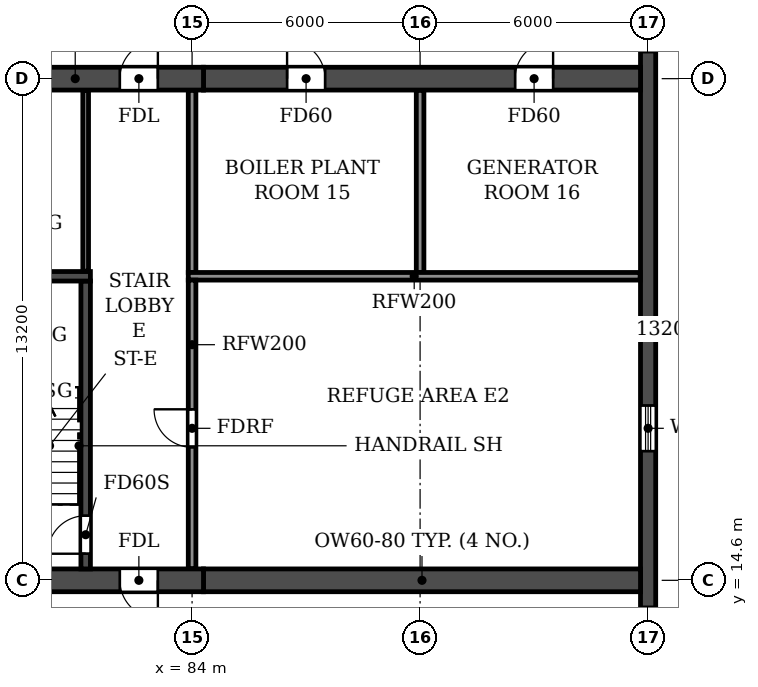
"""IFC4 building model, lengths in metres.
Left out: names, types, materials, properties, quantities, classifications, styles, units other than length and angle.
Written with IfcOpenShell. Run it as: python <this file> out.ifc"""

import sys

from ifc_helpers import new_model, si_unit, direction, frame, frame_2d, origin, place, context, subcontext, project, spatial, rectangle, extrude, element, fill, save


model = new_model("IFC4")
c1 = context("Model", 3, precision=1e-05, world=origin(), true_north=direction((0.0, 1.0)))
c2 = subcontext(c1, "Body", "Model", "MODEL_VIEW")
j1 = project(units=[si_unit("LENGTHUNIT", "METRE"), si_unit("PLANEANGLEUNIT", "RADIAN")], contexts=[c1])
p1 = place(None, origin())
s1 = spatial("IfcSite", under=j1, at=p1, CompositionType="ELEMENT")
p2 = place(p1, origin())
s2 = spatial("IfcBuilding", under=s1, at=p2, CompositionType="ELEMENT")
p3 = place(p2, frame((0.0, 0.0, 66.3)))
s3 = spatial("IfcBuildingStorey", under=s2, at=p3, CompositionType="ELEMENT", Elevation=66.3)
p4 = place(p3, frame((96.0, 4.683, 0.0), z_axis=(0.0, 0.0, 1.0), x_axis=(0.0, 1.0, 0.0)))
e1 = element("IfcWall", 1, at=p4, inside=s3, PredefinedType="SHEAR", context=c2, shape_type="SweptSolid", body=[
    extrude(rectangle(XDim=35.434, YDim=0.4, at=frame_2d((17.717, 0.0))), origin(), (0.0, 0.0, 1.0), 6.36),
])
p5 = place(p4, frame((23.817, 0.0, 0.9)))
e2 = element("IfcOpeningElement", 2, at=p5, cuts=e1, PredefinedType="OPENING", context=c2, shape_type="SweptSolid", body=[
    extrude(rectangle(XDim=1.2, YDim=1.5, at=frame_2d((0.6, 0.75))), frame((0.0, 0.21, 0.0), z_axis=(0.0, -1.0, 0.0), x_axis=(1.0, 0.0, 0.0)), (0.0, 0.0, 1.0), 0.42),
])
p6 = place(p4, frame((8.017, 0.0, 0.9)))
e3 = element("IfcOpeningElement", 3, at=p6, cuts=e1, PredefinedType="OPENING", context=c2, shape_type="SweptSolid", body=[
    extrude(rectangle(XDim=1.2, YDim=1.5, at=frame_2d((0.6, 0.75))), frame((0.0, 0.21, 0.0), z_axis=(0.0, -1.0, 0.0), x_axis=(1.0, 0.0, 0.0)), (0.0, 0.0, 1.0), 0.42),
])
p7 = place(p4, frame((13.317, 0.0, 0.9)))
e4 = element("IfcOpeningElement", 4, at=p7, cuts=e1, PredefinedType="OPENING", context=c2, shape_type="SweptSolid", body=[
    extrude(rectangle(XDim=1.2, YDim=1.5, at=frame_2d((0.6, 0.75))), frame((0.0, 0.21, 0.0), z_axis=(0.0, -1.0, 0.0), x_axis=(1.0, 0.0, 0.0)), (0.0, 0.0, 1.0), 0.42),
])
p8 = place(p3, frame((84.3, 14.6, 0.0), z_axis=(0.0, 0.0, 1.0), x_axis=(1.0, 0.0, 0.0)))
e5 = element("IfcWall", 5, at=p8, inside=s3, PredefinedType="SHEAR", context=c2, shape_type="SweptSolid", body=[
    extrude(rectangle(XDim=11.5, YDim=0.6, at=frame_2d((5.75, 0.0))), origin(), (0.0, 0.0, 1.0), 6.36),
])
p9 = place(p3, frame((84.3, 27.8, 0.0), z_axis=(0.0, 0.0, 1.0), x_axis=(1.0, 0.0, 0.0)))
e6 = element("IfcWall", 6, at=p9, inside=s3, PredefinedType="SHEAR", context=c2, shape_type="SweptSolid", body=[
    extrude(rectangle(XDim=11.5, YDim=0.6, at=frame_2d((5.75, 0.0))), origin(), (0.0, 0.0, 1.0), 6.36),
])
p10 = place(p9, frame((2.2, 0.0, 0.0)))
e7 = element("IfcOpeningElement", 7, at=p10, cuts=e6, PredefinedType="OPENING", context=c2, shape_type="SweptSolid", body=[
    extrude(rectangle(XDim=1.0, YDim=2.1, at=frame_2d((0.5, 1.05))), frame((0.0, 0.31, 0.0), z_axis=(0.0, -1.0, 0.0), x_axis=(1.0, 0.0, 0.0)), (0.0, 0.0, 1.0), 0.62),
])
p11 = place(p9, frame((8.2, 0.0, 0.0)))
e8 = element("IfcOpeningElement", 8, at=p11, cuts=e6, PredefinedType="OPENING", context=c2, shape_type="SweptSolid", body=[
    extrude(rectangle(XDim=1.0, YDim=2.1, at=frame_2d((0.5, 1.05))), frame((0.0, 0.31, 0.0), z_axis=(0.0, -1.0, 0.0), x_axis=(1.0, 0.0, 0.0)), (0.0, 0.0, 1.0), 0.62),
])
p12 = place(p3, frame((77.1, 14.6, 0.0), z_axis=(0.0, 0.0, 1.0), x_axis=(1.0, 0.0, 0.0)))
e9 = element("IfcWall", 9, at=p12, inside=s3, PredefinedType="SOLIDWALL", context=c2, shape_type="SweptSolid", body=[
    extrude(rectangle(XDim=7.2, YDim=0.6, at=frame_2d((3.6, 0.0))), origin(), (0.0, 0.0, 1.0), 6.36),
])
p13 = place(p12, frame((5.0, 0.0, 0.0)))
e10 = element("IfcOpeningElement", 10, at=p13, cuts=e9, PredefinedType="OPENING", context=c2, shape_type="SweptSolid", body=[
    extrude(rectangle(XDim=1.0, YDim=2.1, at=frame_2d((0.5, 1.05))), frame((0.0, 0.31, 0.0), z_axis=(0.0, -1.0, 0.0), x_axis=(1.0, 0.0, 0.0)), (0.0, 0.0, 1.0), 0.62),
])
p14 = place(p3, frame((77.1, 27.8, 0.0), z_axis=(0.0, 0.0, 1.0), x_axis=(1.0, 0.0, 0.0)))
e11 = element("IfcWall", 11, at=p14, inside=s3, PredefinedType="SOLIDWALL", context=c2, shape_type="SweptSolid", body=[
    extrude(rectangle(XDim=7.2, YDim=0.6, at=frame_2d((3.6, 0.0))), origin(), (0.0, 0.0, 1.0), 6.36),
])
p15 = place(p14, frame((1.75, 0.0, 0.0)))
e12 = element("IfcOpeningElement", 12, at=p15, cuts=e11, PredefinedType="OPENING", context=c2, shape_type="SweptSolid", body=[
    extrude(rectangle(XDim=0.9, YDim=2.1, at=frame_2d((0.45, 1.05))), frame((0.0, 0.31, 0.0), z_axis=(0.0, -1.0, 0.0), x_axis=(1.0, 0.0, 0.0)), (0.0, 0.0, 1.0), 0.62),
])
p16 = place(p14, frame((5.0, 0.0, 0.0)))
e13 = element("IfcOpeningElement", 13, at=p16, cuts=e11, PredefinedType="OPENING", context=c2, shape_type="SweptSolid", body=[
    extrude(rectangle(XDim=1.0, YDim=2.1, at=frame_2d((0.5, 1.05))), frame((0.0, 0.31, 0.0), z_axis=(0.0, -1.0, 0.0), x_axis=(1.0, 0.0, 0.0)), (0.0, 0.0, 1.0), 0.62),
])
p17 = place(p3, frame((81.2, 14.9, 0.0), z_axis=(0.0, 0.0, 1.0), x_axis=(0.0, 1.0, 0.0)))
e14 = element("IfcWall", 14, at=p17, inside=s3, PredefinedType="SOLIDWALL", context=c2, shape_type="SweptSolid", body=[
    extrude(rectangle(XDim=7.575, YDim=0.25, at=frame_2d((3.788, 0.0))), origin(), (0.0, 0.0, 1.0), 6.36),
])
p18 = place(p17, frame((0.4, 0.0, 0.0)))
e15 = element("IfcOpeningElement", 15, at=p18, cuts=e14, PredefinedType="OPENING", context=c2, shape_type="SweptSolid", body=[
    extrude(rectangle(XDim=1.0, YDim=2.1, at=frame_2d((0.5, 1.05))), frame((0.0, 0.135, 0.0), z_axis=(0.0, -1.0, 0.0), x_axis=(1.0, 0.0, 0.0)), (0.0, 0.0, 1.0), 0.27),
])
p19 = place(p3, frame((77.275, 22.6, 0.0), z_axis=(0.0, 0.0, 1.0), x_axis=(1.0, 0.0, 0.0)))
e16 = element("IfcWall", 16, at=p19, inside=s3, PredefinedType="SOLIDWALL", context=c2, shape_type="SweptSolid", body=[
    extrude(rectangle(XDim=4.05, YDim=0.25, at=frame_2d((2.025, 0.0))), origin(), (0.0, 0.0, 1.0), 6.36),
])
for number, where, z_axis, x_axis in (
    (17, (84.0, 22.7, 0.0), (0.0, 0.0, 1.0), (0.0, 1.0, 0.0)),
    (18, (90.0, 22.7, 0.0), (0.0, 0.0, 1.0), (0.0, 1.0, 0.0)),
):
    element("IfcWall", number, at=place(p3, frame(where, z_axis=z_axis, x_axis=x_axis)), inside=s3, PredefinedType="PARTITIONING", context=c2, shape_type="SweptSolid", body=[
        extrude(rectangle(XDim=4.79, YDim=0.2, at=frame_2d((2.395, 0.0))), origin(), (0.0, 0.0, 1.0), 6.36),
    ])
p20 = place(p3, frame((83.9, 22.6, 0.0), z_axis=(0.0, 0.0, 1.0), x_axis=(1.0, 0.0, 0.0)))
e19 = element("IfcWall", 19, at=p20, inside=s3, PredefinedType="PARTITIONING", context=c2, shape_type="SweptSolid", body=[
    extrude(rectangle(XDim=11.89, YDim=0.2, at=frame_2d((5.945, 0.0))), origin(), (0.0, 0.0, 1.0), 6.36),
])
p21 = place(p3, frame((84.0, 14.91, 0.0), z_axis=(0.0, 0.0, 1.0), x_axis=(0.0, 1.0, 0.0)))
e20 = element("IfcWall", 20, at=p21, inside=s3, PredefinedType="PARTITIONING", context=c2, shape_type="SweptSolid", body=[
    extrude(rectangle(XDim=7.59, YDim=0.2, at=frame_2d((3.795, 0.0))), origin(), (0.0, 0.0, 1.0), 6.36),
])
p22 = place(p21, frame((3.19, 0.0, 0.0)))
e21 = element("IfcOpeningElement", 21, at=p22, cuts=e20, PredefinedType="OPENING", context=c2, shape_type="SweptSolid", body=[
    extrude(rectangle(XDim=1.0, YDim=2.1, at=frame_2d((0.5, 1.05))), frame((0.0, 0.11, 0.0), z_axis=(0.0, -1.0, 0.0), x_axis=(1.0, 0.0, 0.0)), (0.0, 0.0, 1.0), 0.22),
])
p23 = place(p3, frame((81.2, 22.735, 0.0), z_axis=(0.0, 0.0, 1.0), x_axis=(0.0, 1.0, 0.0)))
e22 = element("IfcWall", 22, at=p23, inside=s3, PredefinedType="PARTITIONING", context=c2, shape_type="SweptSolid", body=[
    extrude(rectangle(XDim=4.755, YDim=0.15, at=frame_2d((2.377, 0.0))), origin(), (0.0, 0.0, 1.0), 6.36),
])
p24 = place(p6, origin())
e23 = element("IfcWindow", 23, at=p24, inside=s3, PartitioningType="SINGLE_PANEL", PredefinedType="WINDOW", context=c2, shape_type="SweptSolid", body=[
    extrude(rectangle(XDim=1.2, YDim=1.5, at=frame_2d((0.6, 0.75))), frame((0.0, 0.03, 0.0), z_axis=(0.0, -1.0, 0.0), x_axis=(1.0, 0.0, 0.0)), (0.0, 0.0, 1.0), 0.06),
])
fill(e3, e23)
p25 = place(p7, origin())
e24 = element("IfcWindow", 24, at=p25, inside=s3, PartitioningType="SINGLE_PANEL", PredefinedType="WINDOW", context=c2, shape_type="SweptSolid", body=[
    extrude(rectangle(XDim=1.2, YDim=1.5, at=frame_2d((0.6, 0.75))), frame((0.0, 0.03, 0.0), z_axis=(0.0, -1.0, 0.0), x_axis=(1.0, 0.0, 0.0)), (0.0, 0.0, 1.0), 0.06),
])
fill(e4, e24)
p26 = place(p16, origin())
e25 = element("IfcDoor", 25, at=p26, inside=s3, OperationType="SINGLE_SWING_RIGHT", PredefinedType="DOOR", context=c2, shape_type="SweptSolid", body=[
    extrude(rectangle(XDim=1.0, YDim=2.1, at=frame_2d((0.5, 1.05))), frame((0.0, 0.025, 0.0), z_axis=(0.0, -1.0, 0.0), x_axis=(1.0, 0.0, 0.0)), (0.0, 0.0, 1.0), 0.05),
])
fill(e13, e25)
p27 = place(p10, origin())
e26 = element("IfcDoor", 26, at=p27, inside=s3, OperationType="SINGLE_SWING_LEFT", PredefinedType="DOOR", context=c2, shape_type="SweptSolid", body=[
    extrude(rectangle(XDim=1.0, YDim=2.1, at=frame_2d((0.5, 1.05))), frame((0.0, 0.025, 0.0), z_axis=(0.0, -1.0, 0.0), x_axis=(1.0, 0.0, 0.0)), (0.0, 0.0, 1.0), 0.05),
])
fill(e7, e26)
p28 = place(p11, origin())
e27 = element("IfcDoor", 27, at=p28, inside=s3, OperationType="SINGLE_SWING_RIGHT", PredefinedType="DOOR", context=c2, shape_type="SweptSolid", body=[
    extrude(rectangle(XDim=1.0, YDim=2.1, at=frame_2d((0.5, 1.05))), frame((0.0, 0.025, 0.0), z_axis=(0.0, -1.0, 0.0), x_axis=(1.0, 0.0, 0.0)), (0.0, 0.0, 1.0), 0.05),
])
fill(e8, e27)
p29 = place(p13, frame((1.0, 0.0, 0.0), z_axis=(0.0, 0.0, 1.0), x_axis=(-1.0, 0.0, 0.0)))
e28 = element("IfcDoor", 28, at=p29, inside=s3, OperationType="SINGLE_SWING_LEFT", PredefinedType="DOOR", context=c2, shape_type="SweptSolid", body=[
    extrude(rectangle(XDim=1.0, YDim=2.1, at=frame_2d((0.5, 1.05))), frame((0.0, 0.025, 0.0), z_axis=(0.0, -1.0, 0.0), x_axis=(1.0, 0.0, 0.0)), (0.0, 0.0, 1.0), 0.05),
])
fill(e10, e28)
p30 = place(p18, origin())
e29 = element("IfcDoor", 29, at=p30, inside=s3, OperationType="SINGLE_SWING_LEFT", PredefinedType="DOOR", context=c2, shape_type="SweptSolid", body=[
    extrude(rectangle(XDim=1.0, YDim=2.1, at=frame_2d((0.5, 1.05))), frame((0.0, 0.025, 0.0), z_axis=(0.0, -1.0, 0.0), x_axis=(1.0, 0.0, 0.0)), (0.0, 0.0, 1.0), 0.05),
])
fill(e15, e29)
p31 = place(p22, origin())
e30 = element("IfcDoor", 30, at=p31, inside=s3, OperationType="SINGLE_SWING_RIGHT", PredefinedType="DOOR", context=c2, shape_type="SweptSolid", body=[
    extrude(rectangle(XDim=1.0, YDim=2.1, at=frame_2d((0.5, 1.05))), frame((0.0, 0.025, 0.0), z_axis=(0.0, -1.0, 0.0), x_axis=(1.0, 0.0, 0.0)), (0.0, 0.0, 1.0), 0.05),
])
fill(e21, e30)
save(model, sys.argv[1])
